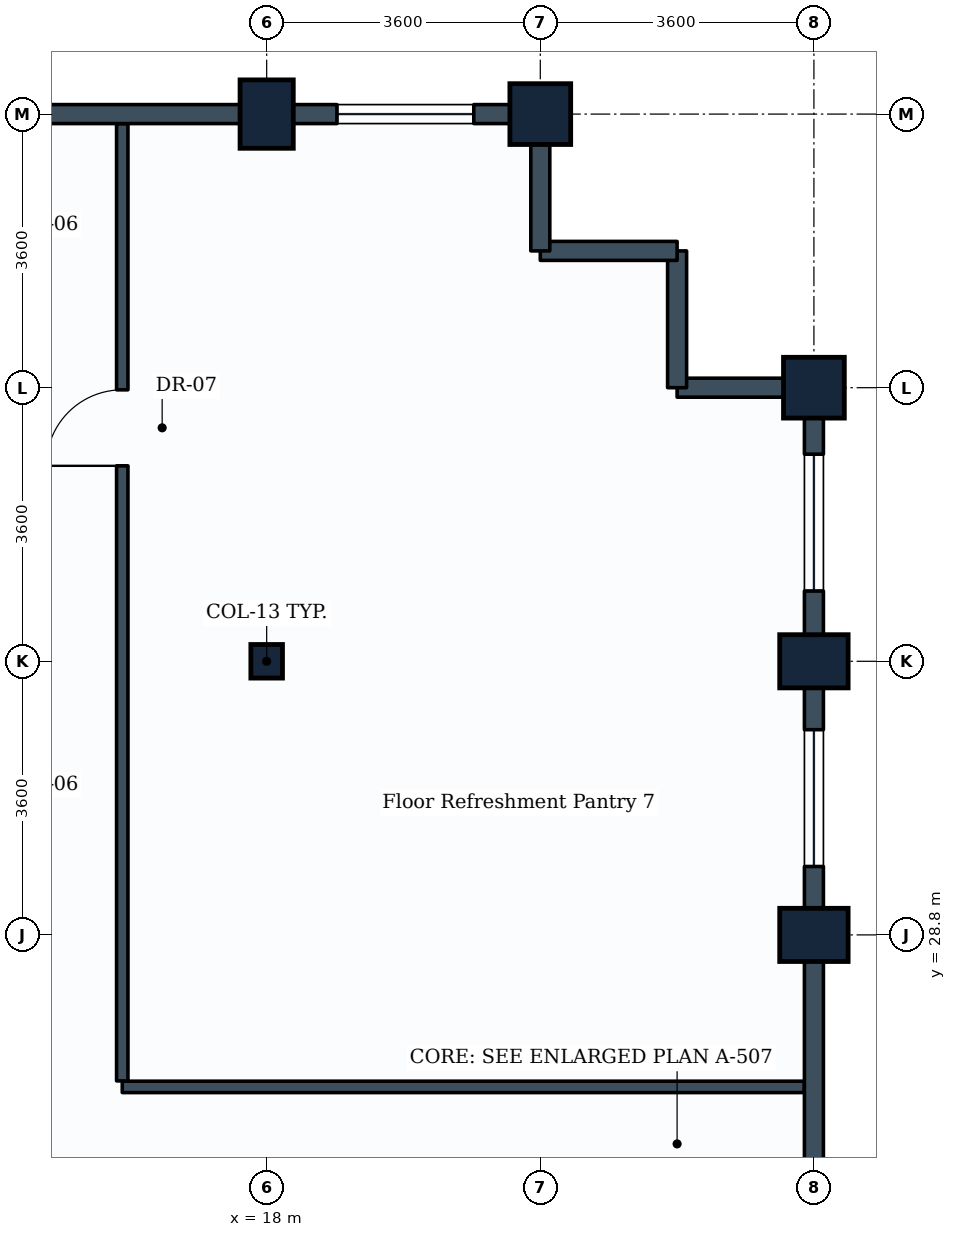
"""IFC4 building model, lengths in metres.
Left out: names, types, materials, properties, quantities, classifications, styles, units other than length and angle.
Written with IfcOpenShell. Run it as: python <this file> out.ifc"""

import sys

from ifc_helpers import new_model, si_unit, direction, frame, frame_2d, origin, origin_2d, place, context, subcontext, project, spatial, rectangle, i_section, extrude, element, fill, save


model = new_model("IFC4")
c1 = context("Model", 3, precision=1e-05, world=origin(), true_north=direction((0.0, 1.0)))
c2 = subcontext(c1, "Body", "Model", "MODEL_VIEW")
j1 = project(units=[si_unit("LENGTHUNIT", "METRE"), si_unit("PLANEANGLEUNIT", "RADIAN")], contexts=[c1])
p1 = place(None, origin())
s1 = spatial("IfcSite", under=j1, at=p1, CompositionType="ELEMENT")
p2 = place(p1, origin())
s2 = spatial("IfcBuilding", under=s1, at=p2, CompositionType="ELEMENT")
p3 = place(p2, frame((0.0, 0.0, 182.4)))
s3 = spatial("IfcBuildingStorey", under=s2, at=p3, CompositionType="ELEMENT", Elevation=182.4)
p4 = place(p3, frame((18.0, 32.4, 0.0), z_axis=(0.0, 0.0, 1.0), x_axis=(1.0, 0.0, 0.0)))
e1 = element("IfcColumn", 1, at=p4, inside=s3, PredefinedType="COLUMN", context=c2, shape_type="SweptSolid", body=[
    extrude(i_section(OverallWidth=0.416, OverallDepth=0.442, WebThickness=0.025, FlangeThickness=0.041, FilletRadius=0.015, at=origin_2d()), origin(), (0.0, 0.0, 1.0), 3.8),
])
p5 = place(p3, frame((18.0, 39.6, 0.0), z_axis=(0.0, 0.0, 1.0), x_axis=(1.0, 0.0, 0.0)))
e2 = element("IfcColumn", 2, at=p5, inside=s3, PredefinedType="COLUMN", context=c2, shape_type="SweptSolid", body=[
    extrude(rectangle(XDim=0.7, YDim=0.9, at=origin_2d()), origin(), (0.0, 0.0, 1.0), 3.8),
])
p6 = place(p3, frame((21.6, 39.6, 0.0), z_axis=(0.0, 0.0, 1.0), x_axis=(1.0, 0.0, 0.0)))
e3 = element("IfcColumn", 3, at=p6, inside=s3, PredefinedType="COLUMN", context=c2, shape_type="SweptSolid", body=[
    extrude(rectangle(XDim=0.8, YDim=0.8, at=origin_2d()), origin(), (0.0, 0.0, 1.0), 3.8),
])
for number, where, z_axis, x_axis in (
    (4, (25.2, 28.8, 0.0), (0.0, 0.0, 1.0), (0.0, 1.0, 0.0)),
    (5, (25.2, 32.4, 0.0), (0.0, 0.0, 1.0), (0.0, 1.0, 0.0)),
):
    element("IfcColumn", number, at=place(p3, frame(where, z_axis=z_axis, x_axis=x_axis)), inside=s3, PredefinedType="COLUMN", context=c2, shape_type="SweptSolid", body=[
        extrude(rectangle(XDim=0.7, YDim=0.9, at=origin_2d()), origin(), (0.0, 0.0, 1.0), 3.8),
    ])
p7 = place(p3, frame((25.2, 36.0, 0.0), z_axis=(0.0, 0.0, 1.0), x_axis=(0.0, 1.0, 0.0)))
e6 = element("IfcColumn", 6, at=p7, inside=s3, PredefinedType="COLUMN", context=c2, shape_type="SweptSolid", body=[
    extrude(rectangle(XDim=0.8, YDim=0.8, at=origin_2d()), origin(), (0.0, 0.0, 1.0), 3.8),
])
p8 = place(p3, frame((25.2, 25.2, 0.0), z_axis=(0.0, 0.0, 1.0), x_axis=(0.0, 1.0, 0.0)))
e7 = element("IfcWall", 7, at=p8, inside=s3, PredefinedType="STANDARD", context=c2, shape_type="SweptSolid", body=[
    extrude(rectangle(XDim=3.6, YDim=0.25, at=frame_2d((1.8, 0.0))), origin(), (0.0, 0.0, 1.0), 2.93),
])
p9 = place(p3, frame((25.2, 28.8, 0.0), z_axis=(0.0, 0.0, 1.0), x_axis=(0.0, 1.0, 0.0)))
e8 = element("IfcWall", 8, at=p9, inside=s3, PredefinedType="STANDARD", context=c2, shape_type="SweptSolid", body=[
    extrude(rectangle(XDim=3.6, YDim=0.25, at=frame_2d((1.8, 0.0))), origin(), (0.0, 0.0, 1.0), 2.93),
])
p10 = place(p9, frame((0.9, 0.0, 0.85)))
e9 = element("IfcOpeningElement", 9, at=p10, cuts=e8, PredefinedType="OPENING", context=c2, shape_type="SweptSolid", body=[
    extrude(rectangle(XDim=1.8, YDim=1.35, at=frame_2d((0.9, 0.675))), frame((0.0, 0.135, 0.0), z_axis=(0.0, -1.0, 0.0), x_axis=(1.0, 0.0, 0.0)), (0.0, 0.0, 1.0), 0.27),
])
p11 = place(p3, frame((25.2, 32.4, 0.0), z_axis=(0.0, 0.0, 1.0), x_axis=(0.0, 1.0, 0.0)))
e10 = element("IfcWall", 10, at=p11, inside=s3, PredefinedType="STANDARD", context=c2, shape_type="SweptSolid", body=[
    extrude(rectangle(XDim=3.6, YDim=0.25, at=frame_2d((1.8, 0.0))), origin(), (0.0, 0.0, 1.0), 2.93),
])
p12 = place(p11, frame((0.925, 0.0, 0.85)))
e11 = element("IfcOpeningElement", 11, at=p12, cuts=e10, PredefinedType="OPENING", context=c2, shape_type="SweptSolid", body=[
    extrude(rectangle(XDim=1.8, YDim=1.35, at=frame_2d((0.9, 0.675))), frame((0.0, 0.135, 0.0), z_axis=(0.0, -1.0, 0.0), x_axis=(1.0, 0.0, 0.0)), (0.0, 0.0, 1.0), 0.27),
])
p13 = place(p3, frame((23.4, 36.0, 0.0), z_axis=(0.0, 0.0, 1.0), x_axis=(1.0, 0.0, 0.0)))
e12 = element("IfcWall", 12, at=p13, inside=s3, PredefinedType="STANDARD", context=c2, shape_type="SweptSolid", body=[
    extrude(rectangle(XDim=1.8, YDim=0.25, at=frame_2d((0.9, 0.0))), origin(), (0.0, 0.0, 1.0), 2.93),
])
p14 = place(p3, frame((23.4, 36.0, 0.0), z_axis=(0.0, 0.0, 1.0), x_axis=(0.0, 1.0, 0.0)))
e13 = element("IfcWall", 13, at=p14, inside=s3, PredefinedType="STANDARD", context=c2, shape_type="SweptSolid", body=[
    extrude(rectangle(XDim=1.8, YDim=0.25, at=frame_2d((0.9, 0.0))), origin(), (0.0, 0.0, 1.0), 3.535),
])
p15 = place(p3, frame((21.6, 37.8, 0.0), z_axis=(0.0, 0.0, 1.0), x_axis=(1.0, 0.0, 0.0)))
e14 = element("IfcWall", 14, at=p15, inside=s3, PredefinedType="STANDARD", context=c2, shape_type="SweptSolid", body=[
    extrude(rectangle(XDim=1.8, YDim=0.25, at=frame_2d((0.9, 0.0))), origin(), (0.0, 0.0, 1.0), 3.535),
])
p16 = place(p3, frame((21.6, 37.8, 0.0), z_axis=(0.0, 0.0, 1.0), x_axis=(0.0, 1.0, 0.0)))
e15 = element("IfcWall", 15, at=p16, inside=s3, PredefinedType="STANDARD", context=c2, shape_type="SweptSolid", body=[
    extrude(rectangle(XDim=1.8, YDim=0.25, at=frame_2d((0.9, 0.0))), origin(), (0.0, 0.0, 1.0), 2.93),
])
p17 = place(p3, frame((18.0, 39.6, 0.0), z_axis=(0.0, 0.0, 1.0), x_axis=(1.0, 0.0, 0.0)))
e16 = element("IfcWall", 16, at=p17, inside=s3, PredefinedType="STANDARD", context=c2, shape_type="SweptSolid", body=[
    extrude(rectangle(XDim=3.6, YDim=0.25, at=frame_2d((1.8, 0.0))), origin(), (0.0, 0.0, 1.0), 2.93),
])
p18 = place(p17, frame((0.925, 0.0, 0.85)))
e17 = element("IfcOpeningElement", 17, at=p18, cuts=e16, PredefinedType="OPENING", context=c2, shape_type="SweptSolid", body=[
    extrude(rectangle(XDim=1.8, YDim=1.35, at=frame_2d((0.9, 0.675))), frame((0.0, 0.135, 0.0), z_axis=(0.0, -1.0, 0.0), x_axis=(1.0, 0.0, 0.0)), (0.0, 0.0, 1.0), 0.27),
])
p19 = place(p3, frame((14.4, 39.6, 0.0), z_axis=(0.0, 0.0, 1.0), x_axis=(1.0, 0.0, 0.0)))
e18 = element("IfcWall", 18, at=p19, inside=s3, PredefinedType="STANDARD", context=c2, shape_type="SweptSolid", body=[
    extrude(rectangle(XDim=3.6, YDim=0.25, at=frame_2d((1.8, 0.0))), origin(), (0.0, 0.0, 1.0), 2.93),
])
p20 = place(p3, frame((16.1, 26.8, 0.0), z_axis=(0.0, 0.0, 1.0), x_axis=(1.0, 0.0, 0.0)))
e19 = element("IfcWall", 19, at=p20, inside=s3, PredefinedType="PARTITIONING", context=c2, shape_type="SweptSolid", body=[
    extrude(rectangle(XDim=8.971, YDim=0.15, at=frame_2d((4.485, 0.0))), origin(), (0.0, 0.0, 1.0), 2.93),
])
p21 = place(p3, frame((16.1, 26.879, 0.0), z_axis=(0.0, 0.0, 1.0), x_axis=(0.0, 1.0, 0.0)))
e20 = element("IfcWall", 20, at=p21, inside=s3, PredefinedType="PARTITIONING", context=c2, shape_type="SweptSolid", body=[
    extrude(rectangle(XDim=12.592, YDim=0.15, at=frame_2d((6.296, 0.0))), origin(), (0.0, 0.0, 1.0), 2.93),
])
p22 = place(p21, frame((8.093, 0.0, 0.0)))
e21 = element("IfcOpeningElement", 21, at=p22, cuts=e20, PredefinedType="OPENING", context=c2, shape_type="SweptSolid", body=[
    extrude(rectangle(XDim=1.0, YDim=2.1, at=frame_2d((0.5, 1.05))), frame((0.0, 0.085, 0.0), z_axis=(0.0, -1.0, 0.0), x_axis=(1.0, 0.0, 0.0)), (0.0, 0.0, 1.0), 0.17),
])
p23 = place(p10, origin())
e22 = element("IfcWindow", 22, at=p23, inside=s3, PartitioningType="SINGLE_PANEL", PredefinedType="WINDOW", context=c2, shape_type="SweptSolid", body=[
    extrude(rectangle(XDim=1.8, YDim=1.35, at=frame_2d((0.9, 0.675))), frame((0.0, 0.03, 0.0), z_axis=(0.0, -1.0, 0.0), x_axis=(1.0, 0.0, 0.0)), (0.0, 0.0, 1.0), 0.06),
])
fill(e9, e22)
p24 = place(p12, origin())
e23 = element("IfcWindow", 23, at=p24, inside=s3, PartitioningType="SINGLE_PANEL", PredefinedType="WINDOW", context=c2, shape_type="SweptSolid", body=[
    extrude(rectangle(XDim=1.8, YDim=1.35, at=frame_2d((0.9, 0.675))), frame((0.0, 0.03, 0.0), z_axis=(0.0, -1.0, 0.0), x_axis=(1.0, 0.0, 0.0)), (0.0, 0.0, 1.0), 0.06),
])
fill(e11, e23)
p25 = place(p18, origin())
e24 = element("IfcWindow", 24, at=p25, inside=s3, PartitioningType="SINGLE_PANEL", PredefinedType="WINDOW", context=c2, shape_type="SweptSolid", body=[
    extrude(rectangle(XDim=1.8, YDim=1.35, at=frame_2d((0.9, 0.675))), frame((0.0, 0.03, 0.0), z_axis=(0.0, -1.0, 0.0), x_axis=(1.0, 0.0, 0.0)), (0.0, 0.0, 1.0), 0.06),
])
fill(e17, e24)
p26 = place(p22, origin())
e25 = element("IfcDoor", 25, at=p26, inside=s3, OperationType="SINGLE_SWING_LEFT", PredefinedType="DOOR", context=c2, shape_type="SweptSolid", body=[
    extrude(rectangle(XDim=1.0, YDim=2.1, at=frame_2d((0.5, 1.05))), frame((0.0, 0.025, 0.0), z_axis=(0.0, -1.0, 0.0), x_axis=(1.0, 0.0, 0.0)), (0.0, 0.0, 1.0), 0.05),
])
fill(e21, e25)
save(model, sys.argv[1])
